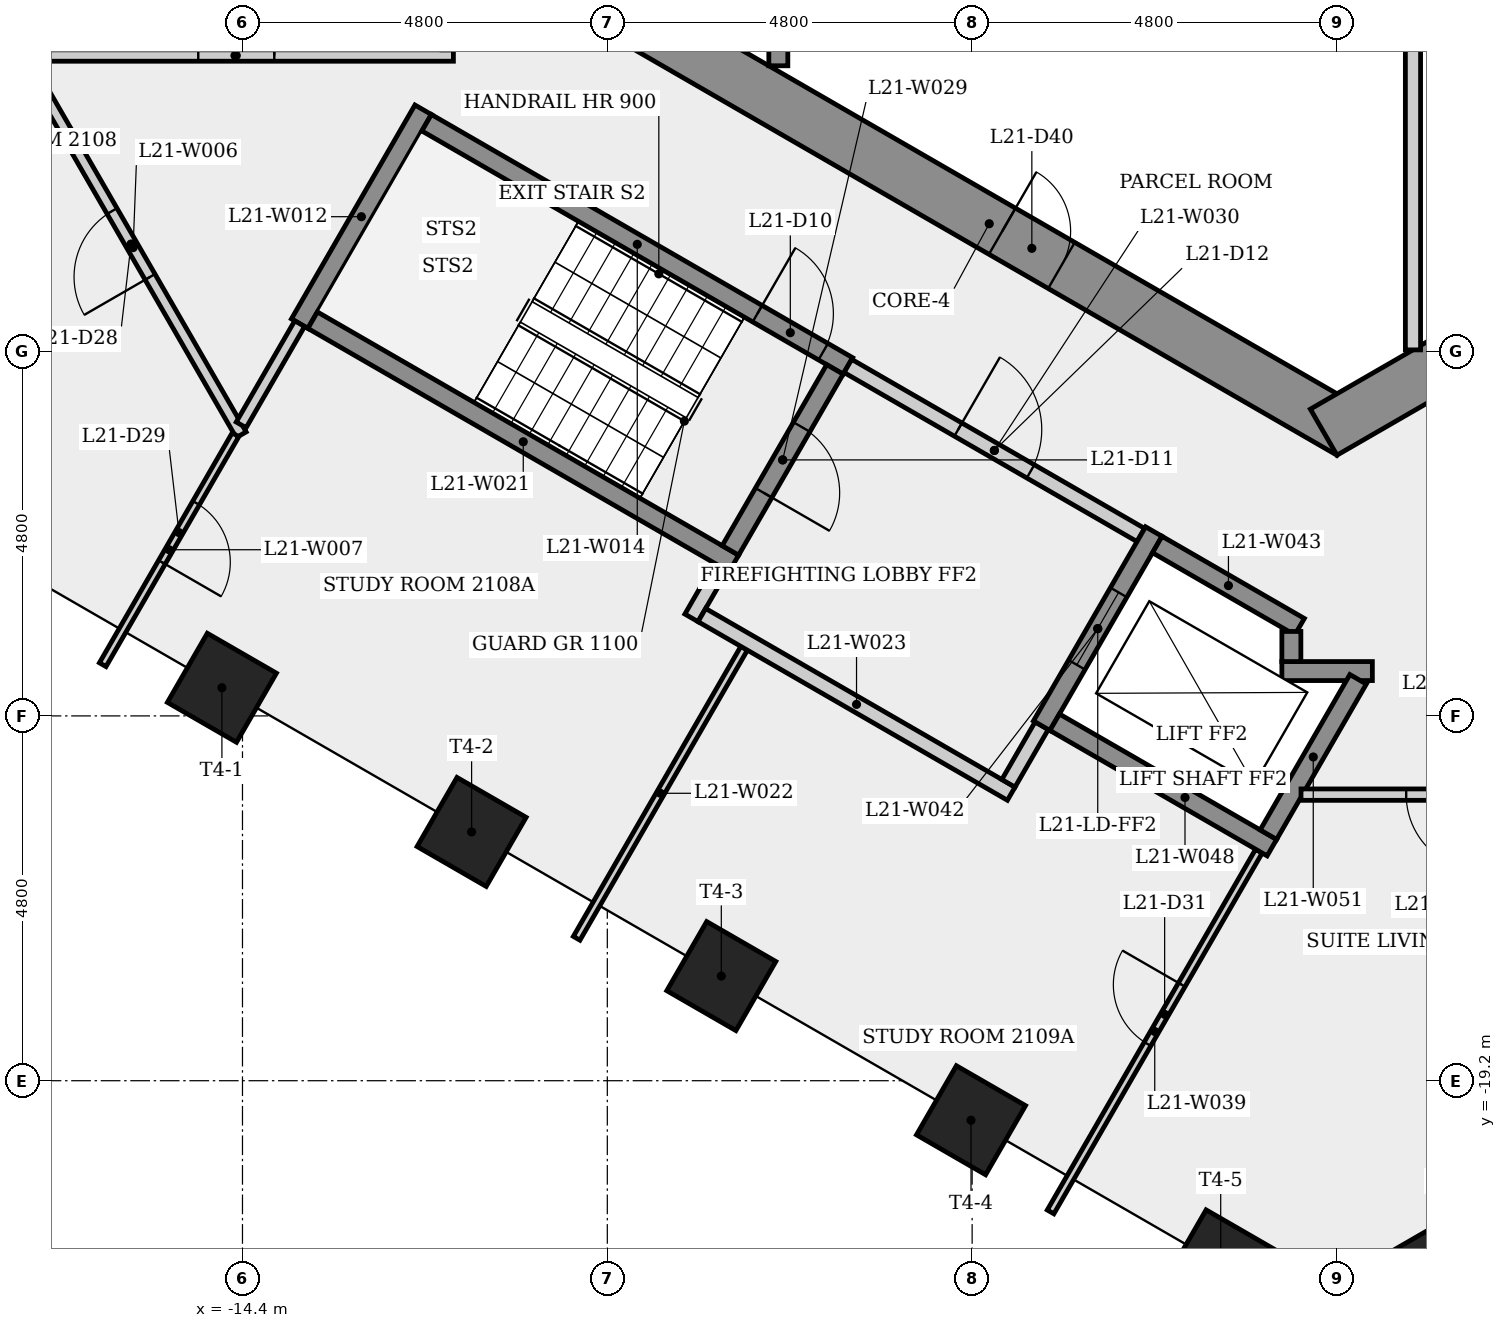
"""IFC4 building model, lengths in metres.
Left out: names, types, materials, properties, quantities, classifications, styles, units other than length and angle.
Written with IfcOpenShell. Run it as: python <this file> out.ifc"""

import sys

from ifc_helpers import new_model, si_unit, direction, frame, frame_2d, origin, origin_2d, place, context, subcontext, project, spatial, rectangle, extrude, element, fill, save


model = new_model("IFC4")
c1 = context("Model", 3, precision=1e-05, world=origin(), true_north=direction((0.0, 1.0)))
c2 = subcontext(c1, "Body", "Model", "MODEL_VIEW")
j1 = project(units=[si_unit("LENGTHUNIT", "METRE"), si_unit("PLANEANGLEUNIT", "RADIAN")], contexts=[c1])
p1 = place(None, origin())
s1 = spatial("IfcSite", under=j1, at=p1, CompositionType="ELEMENT")
p2 = place(p1, origin())
s2 = spatial("IfcBuilding", under=s1, at=p2, CompositionType="ELEMENT")
p3 = place(p2, frame((0.0, 0.0, 83.1)))
s3 = spatial("IfcBuildingStorey", under=s2, at=p3, CompositionType="ELEMENT", Elevation=83.1)
p4 = place(p3, frame((-9.325, -5.182, 0.0), z_axis=(0.0, 0.0, 1.0), x_axis=(0.866023993627, -0.500002442456, 0.0)))
e1 = element("IfcWall", 1, at=p4, inside=s3, PredefinedType="SHEAR", context=c2, shape_type="SweptSolid", body=[
    extrude(rectangle(XDim=10.97, YDim=0.7, at=frame_2d((5.485, 0.0))), origin(), (0.0, 0.0, 1.0), 3.4),
])
p5 = place(p4, frame((5.682, 0.0, 0.0)))
e2 = element("IfcOpeningElement", 2, at=p5, cuts=e1, PredefinedType="OPENING", context=c2, shape_type="SweptSolid", body=[
    extrude(rectangle(XDim=0.9, YDim=2.1, at=frame_2d((0.45, 1.05))), frame((0.0, 0.36, 0.0), z_axis=(0.0, -1.0, 0.0), x_axis=(1.0, 0.0, 0.0)), (0.0, 0.0, 1.0), 0.72),
])
p6 = place(p3, frame((-0.175, -10.667, 0.0), z_axis=(0.0, 0.0, 1.0), x_axis=(0.866023993627, 0.500002442456, 0.0)))
e3 = element("IfcWall", 3, at=p6, inside=s3, PredefinedType="SHEAR", context=c2, shape_type="SweptSolid", body=[
    extrude(rectangle(XDim=10.97, YDim=0.7, at=frame_2d((5.485, 0.0))), origin(), (0.0, 0.0, 1.0), 3.4),
])
p7 = place(p6, frame((7.252, 0.0, 0.0)))
e4 = element("IfcOpeningElement", 4, at=p7, cuts=e3, PredefinedType="OPENING", context=c2, shape_type="SweptSolid", body=[
    extrude(rectangle(XDim=0.9, YDim=2.1, at=frame_2d((0.45, 1.05))), frame((0.0, 0.36, 0.0), z_axis=(0.0, -1.0, 0.0), x_axis=(1.0, 0.0, 0.0)), (0.0, 0.0, 1.0), 0.72),
])
for number, where, z_axis, x_axis in (
    (5, (-14.671, -14.03, 0.0), (0.0, 0.0, 1.0), (-0.5, -0.866, 0.0)),
    (6, (-11.385, -15.927, 0.0), (0.0, 0.0, 1.0), (-0.5, -0.866, 0.0)),
    (7, (-8.1, -17.823, 0.0), (0.0, 0.0, 1.0), (-0.5, -0.866, 0.0)),
    (8, (-4.815, -19.72, 0.0), (0.0, 0.0, 1.0), (-0.5, -0.866, 0.0)),
    (9, (-1.53, -21.617, 0.0), (0.0, 0.0, 1.0), (-0.5, -0.866, 0.0)),
    (10, (1.47, -21.617, 0.0), (0.0, 0.0, 1.0), (0.5, -0.866, 0.0)),
):
    element("IfcColumn", number, at=place(p3, frame(where, z_axis=z_axis, x_axis=x_axis)), inside=s3, PredefinedType="COLUMN", context=c2, shape_type="SweptSolid", body=[
        extrude(rectangle(XDim=1.05, YDim=1.05, at=origin_2d()), origin(), (0.0, 0.0, 1.0), 3.4),
    ])
p8 = place(p3, frame((-17.373, -5.711, 0.0), z_axis=(0.0, 0.0, 1.0), x_axis=(1.0, 0.0, 0.0)))
e11 = element("IfcWall", 11, at=p8, inside=s3, PredefinedType="PARTITIONING", context=c2, shape_type="SweptSolid", body=[
    extrude(rectangle(XDim=5.748, YDim=0.15, at=frame_2d((2.874, 0.0))), origin(), (0.0, 0.0, 1.0), 3.05),
])
p9 = place(p8, frame((2.391, 0.0, 0.0)))
e12 = element("IfcOpeningElement", 12, at=p9, cuts=e11, PredefinedType="OPENING", context=c2, shape_type="SweptSolid", body=[
    extrude(rectangle(XDim=1.0, YDim=2.1, at=frame_2d((0.5, 1.05))), frame((0.0, 0.085, 0.0), z_axis=(0.0, -1.0, 0.0), x_axis=(1.0, 0.0, 0.0)), (0.0, 0.0, 1.0), 0.17),
])
p10 = place(p3, frame((-14.417, -10.701, 0.0), z_axis=(0.0, 0.0, 1.0), x_axis=(-0.499985050258, 0.86603403485, 0.0)))
e13 = element("IfcWall", 13, at=p10, inside=s3, PredefinedType="PARTITIONING", context=c2, shape_type="SweptSolid", body=[
    extrude(rectangle(XDim=5.687, YDim=0.15, at=frame_2d((2.844, 0.0))), origin(), (0.0, 0.0, 1.0), 3.05),
])
p11 = place(p10, frame((2.398, 0.0, 0.0)))
e14 = element("IfcOpeningElement", 14, at=p11, cuts=e13, PredefinedType="OPENING", context=c2, shape_type="SweptSolid", body=[
    extrude(rectangle(XDim=1.0, YDim=2.1, at=frame_2d((0.5, 1.05))), frame((0.0, 0.085, 0.0), z_axis=(0.0, -1.0, 0.0), x_axis=(1.0, 0.0, 0.0)), (0.0, 0.0, 1.0), 0.17),
])
p12 = place(p3, frame((-14.492, -10.701, 0.0), z_axis=(0.0, 0.0, 1.0), x_axis=(-0.500024920542, -0.866011015424, 0.0)))
e15 = element("IfcWall", 15, at=p12, inside=s3, PredefinedType="PARTITIONING", context=c2, shape_type="SweptSolid", body=[
    extrude(rectangle(XDim=3.493, YDim=0.1, at=frame_2d((1.747, 0.0))), origin(), (0.0, 0.0, 1.0), 3.05),
])
p13 = place(p12, frame((1.036, 0.0, 0.0)))
e16 = element("IfcOpeningElement", 16, at=p13, cuts=e15, PredefinedType="OPENING", context=c2, shape_type="SweptSolid", body=[
    extrude(rectangle(XDim=0.9, YDim=2.1, at=frame_2d((0.45, 1.05))), frame((0.0, 0.06, 0.0), z_axis=(0.0, -1.0, 0.0), x_axis=(1.0, 0.0, 0.0)), (0.0, 0.0, 1.0), 0.12),
])
p14 = place(p3, frame((-13.648, -9.239, 0.0), z_axis=(0.0, 0.0, 1.0), x_axis=(0.500017246033, 0.866015446554, 0.0)))
e17 = element("IfcWall", 17, at=p14, inside=s3, PredefinedType="SHEAR", context=c2, shape_type="SweptSolid", body=[
    extrude(rectangle(XDim=3.25, YDim=0.25, at=frame_2d((1.625, 0.0))), origin(), (0.0, 0.0, 1.0), 3.05),
])
p15 = place(p3, frame((-13.648, -9.239, 0.0), z_axis=(0.0, 0.0, 1.0), x_axis=(-0.500116286968, -0.865958255061, 0.0)))
e18 = element("IfcWall", 18, at=p15, inside=s3, PredefinedType="PARTITIONING", context=c2, shape_type="SweptSolid", body=[
    extrude(rectangle(XDim=1.538, YDim=0.15, at=frame_2d((0.769, 0.0))), origin(), (0.0, 0.0, 1.0), 3.05),
])
p16 = place(p3, frame((-11.977, -6.595, 0.0), z_axis=(0.0, 0.0, 1.0), x_axis=(0.866025499775, -0.499999833739, 0.0)))
e19 = element("IfcWall", 19, at=p16, inside=s3, PredefinedType="SHEAR", context=c2, shape_type="SweptSolid", body=[
    extrude(rectangle(XDim=6.4, YDim=0.25, at=frame_2d((3.2, 0.0))), origin(), (0.0, 0.0, 1.0), 3.05),
])
p17 = place(p16, frame((5.025, 0.0, 0.0)))
e20 = element("IfcOpeningElement", 20, at=p17, cuts=e19, PredefinedType="OPENING", context=c2, shape_type="SweptSolid", body=[
    extrude(rectangle(XDim=1.0, YDim=2.1, at=frame_2d((0.5, 1.05))), frame((0.0, 0.135, 0.0), z_axis=(0.0, -1.0, 0.0), x_axis=(1.0, 0.0, 0.0)), (0.0, 0.0, 1.0), 0.27),
])
p18 = place(p3, frame((-8.493, -13.11, 0.0), z_axis=(0.0, 0.0, 1.0), x_axis=(0.500067724834, 0.865986299303, 0.0)))
e21 = element("IfcWall", 21, at=p18, inside=s3, PredefinedType="PARTITIONING", context=c2, shape_type="SweptSolid", body=[
    extrude(rectangle(XDim=0.775, YDim=0.2, at=frame_2d((0.388, 0.0))), origin(), (0.0, 0.0, 1.0), 3.05),
])
p19 = place(p3, frame((-7.935, -12.393, 0.0), z_axis=(0.0, 0.0, 1.0), x_axis=(-0.866025499775, 0.499999833739, 0.0)))
e22 = element("IfcWall", 22, at=p19, inside=s3, PredefinedType="SHEAR", context=c2, shape_type="SweptSolid", body=[
    extrude(rectangle(XDim=6.4, YDim=0.25, at=frame_2d((3.2, 0.0))), origin(), (0.0, 0.0, 1.0), 3.05),
])
p20 = place(p3, frame((-7.8, -13.51, 0.0), z_axis=(0.0, 0.0, 1.0), x_axis=(-0.5000181976, -0.86601489714, 0.0)))
e23 = element("IfcWall", 23, at=p20, inside=s3, PredefinedType="PARTITIONING", context=c2, shape_type="SweptSolid", body=[
    extrude(rectangle(XDim=4.406, YDim=0.1, at=frame_2d((2.203, 0.0))), origin(), (0.0, 0.0, 1.0), 3.05),
])
p21 = place(p3, frame((-8.356, -13.073, 0.0), z_axis=(0.0, 0.0, 1.0), x_axis=(0.866038532462, -0.499977259774, 0.0)))
e24 = element("IfcWall", 24, at=p21, inside=s3, PredefinedType="PARTITIONING", context=c2, shape_type="SweptSolid", body=[
    extrude(rectangle(XDim=4.7, YDim=0.2, at=frame_2d((2.35, 0.0))), origin(), (0.0, 0.0, 1.0), 3.05),
])
p22 = place(p3, frame((-7.35, -5.846, 0.0), z_axis=(0.0, 0.0, 1.0), x_axis=(0.0, 1.0, 0.0)))
e25 = element("IfcWall", 25, at=p22, inside=s3, PredefinedType="SHEAR", context=c2, shape_type="SweptSolid", body=[
    extrude(rectangle(XDim=4.171, YDim=0.25, at=frame_2d((2.085, 0.0))), origin(), (0.0, 0.0, 1.0), 3.05),
])
p23 = place(p3, frame((-6.605, -9.841, 0.0), z_axis=(0.0, 0.0, 1.0), x_axis=(-0.499996545922, -0.866027397988, 0.0)))
e26 = element("IfcWall", 26, at=p23, inside=s3, PredefinedType="SHEAR", context=c2, shape_type="SweptSolid", body=[
    extrude(rectangle(XDim=2.75, YDim=0.25, at=frame_2d((1.375, 0.0))), origin(), (0.0, 0.0, 1.0), 3.05),
])
p24 = place(p23, frame((0.875, 0.0, 0.0)))
e27 = element("IfcOpeningElement", 27, at=p24, cuts=e26, PredefinedType="OPENING", context=c2, shape_type="SweptSolid", body=[
    extrude(rectangle(XDim=1.0, YDim=2.1, at=frame_2d((0.5, 1.05))), frame((0.0, 0.135, 0.0), z_axis=(0.0, -1.0, 0.0), x_axis=(1.0, 0.0, 0.0)), (0.0, 0.0, 1.0), 0.27),
])
p25 = place(p3, frame((-6.435, -9.795, 0.0), z_axis=(0.0, 0.0, 1.0), x_axis=(0.866012907634, -0.500021643343, 0.0)))
e28 = element("IfcWall", 28, at=p25, inside=s3, PredefinedType="PARTITIONING", context=c2, shape_type="SweptSolid", body=[
    extrude(rectangle(XDim=4.45, YDim=0.2, at=frame_2d((2.225, 0.0))), origin(), (0.0, 0.0, 1.0), 3.05),
])
p26 = place(p25, frame((1.675, 0.0, 0.0)))
e29 = element("IfcOpeningElement", 29, at=p26, cuts=e28, PredefinedType="OPENING", context=c2, shape_type="SweptSolid", body=[
    extrude(rectangle(XDim=1.1, YDim=2.1, at=frame_2d((0.55, 1.05))), frame((0.0, 0.11, 0.0), z_axis=(0.0, -1.0, 0.0), x_axis=(1.0, 0.0, 0.0)), (0.0, 0.0, 1.0), 0.22),
])
p27 = place(p3, frame((-3.885, -14.529, 0.0), z_axis=(0.0, 0.0, 1.0), x_axis=(-0.499859285417, -0.866106630146, 0.0)))
e30 = element("IfcWall", 30, at=p27, inside=s3, PredefinedType="PARTITIONING", context=c2, shape_type="SweptSolid", body=[
    extrude(rectangle(XDim=0.875, YDim=0.2, at=frame_2d((0.438, 0.0))), origin(), (0.0, 0.0, 1.0), 3.05),
])
p28 = place(p3, frame((-3.768, -20.926, 0.0), z_axis=(0.0, 0.0, 1.0), x_axis=(0.499980760091, 0.866036511666, 0.0)))
e31 = element("IfcWall", 31, at=p28, inside=s3, PredefinedType="PARTITIONING", context=c2, shape_type="SweptSolid", body=[
    extrude(rectangle(XDim=5.482, YDim=0.1, at=frame_2d((2.741, 0.0))), origin(), (0.0, 0.0, 1.0), 3.05),
])
p29 = place(p28, frame((2.551, 0.0, 0.0)))
e32 = element("IfcOpeningElement", 32, at=p29, cuts=e31, PredefinedType="OPENING", context=c2, shape_type="SweptSolid", body=[
    extrude(rectangle(XDim=0.9, YDim=2.1, at=frame_2d((0.45, 1.05))), frame((0.0, 0.06, 0.0), z_axis=(0.0, -1.0, 0.0), x_axis=(1.0, 0.0, 0.0)), (0.0, 0.0, 1.0), 0.12),
])
p30 = place(p3, frame((-2.41, -11.974, 0.0), z_axis=(0.0, 0.0, 1.0), x_axis=(-0.500001826776, -0.866024349092, 0.0)))
e33 = element("IfcWall", 33, at=p30, inside=s3, PredefinedType="SHEAR", context=c2, shape_type="SweptSolid", body=[
    extrude(rectangle(XDim=2.95, YDim=0.25, at=frame_2d((1.475, 0.0))), origin(), (0.0, 0.0, 1.0), 3.05),
])
p31 = place(p30, frame((0.925, 0.0, 0.0)))
e34 = element("IfcOpeningElement", 34, at=p31, cuts=e33, PredefinedType="OPENING", context=c2, shape_type="SweptSolid", body=[
    extrude(rectangle(XDim=1.1, YDim=2.1, at=frame_2d((0.55, 1.05))), frame((0.0, 0.135, 0.0), z_axis=(0.0, -1.0, 0.0), x_axis=(1.0, 0.0, 0.0)), (0.0, 0.0, 1.0), 0.27),
])
p32 = place(p3, frame((-2.364, -12.145, 0.0), z_axis=(0.0, 0.0, 1.0), x_axis=(0.86603892542, -0.499976579108, 0.0)))
e35 = element("IfcWall", 35, at=p32, inside=s3, PredefinedType="SHEAR", context=c2, shape_type="SweptSolid", body=[
    extrude(rectangle(XDim=2.162, YDim=0.25, at=frame_2d((1.081, 0.0))), origin(), (0.0, 0.0, 1.0), 3.05),
])
p33 = place(p3, frame((-0.856, -16.133, 0.0), z_axis=(0.0, 0.0, 1.0), x_axis=(-0.866021716278, 0.500006386895, 0.0)))
e36 = element("IfcWall", 36, at=p33, inside=s3, PredefinedType="SHEAR", context=c2, shape_type="SweptSolid", body=[
    extrude(rectangle(XDim=3.3, YDim=0.25, at=frame_2d((1.65, 0.0))), origin(), (0.0, 0.0, 1.0), 3.05),
])
p34 = place(p3, frame((-0.725, -13.81, 0.0), z_axis=(0.0, 0.0, 1.0), x_axis=(1.0, 0.0, 0.0)))
e37 = element("IfcWall", 37, at=p34, inside=s3, PredefinedType="SHEAR", context=c2, shape_type="SweptSolid", body=[
    extrude(rectangle(XDim=1.191, YDim=0.25, at=frame_2d((0.595, 0.0))), origin(), (0.0, 0.0, 1.0), 3.05),
])
p35 = place(p3, frame((-0.6, -13.289, 0.0), z_axis=(0.0, 0.0, 1.0), x_axis=(0.0, -1.0, 0.0)))
e38 = element("IfcWall", 38, at=p35, inside=s3, PredefinedType="SHEAR", context=c2, shape_type="SweptSolid", body=[
    extrude(rectangle(XDim=0.396, YDim=0.25, at=frame_2d((0.198, 0.0))), origin(), (0.0, 0.0, 1.0), 3.4),
])
p36 = place(p3, frame((-0.902, -15.962, 0.0), z_axis=(0.0, 0.0, 1.0), x_axis=(0.49998806882, 0.866032292145, 0.0)))
e39 = element("IfcWall", 39, at=p36, inside=s3, PredefinedType="SHEAR", context=c2, shape_type="SweptSolid", body=[
    extrude(rectangle(XDim=2.36, YDim=0.25, at=frame_2d((1.18, 0.0))), origin(), (0.0, 0.0, 1.0), 3.4),
])
p37 = place(p3, frame((1.0, -5.275, 0.0), z_axis=(0.0, 0.0, 1.0), x_axis=(0.0, -1.0, 0.0)))
e40 = element("IfcWall", 40, at=p37, inside=s3, PredefinedType="PARTITIONING", context=c2, shape_type="SweptSolid", body=[
    extrude(rectangle(XDim=4.309, YDim=0.2, at=frame_2d((2.155, 0.0))), origin(), (0.0, 0.0, 1.0), 3.05),
])
p38 = place(p3, frame((3.294, -15.436, 0.0), z_axis=(0.0, 0.0, 1.0), x_axis=(-1.0, 0.0, 0.0)))
e41 = element("IfcWall", 41, at=p38, inside=s3, PredefinedType="PARTITIONING", context=c2, shape_type="SweptSolid", body=[
    extrude(rectangle(XDim=3.768, YDim=0.15, at=frame_2d((1.884, 0.0))), origin(), (0.0, 0.0, 1.0), 3.05),
])
p39 = place(p38, frame((1.384, 0.0, 0.0)))
e42 = element("IfcOpeningElement", 42, at=p39, cuts=e41, PredefinedType="OPENING", context=c2, shape_type="SweptSolid", body=[
    extrude(rectangle(XDim=1.0, YDim=2.1, at=frame_2d((0.5, 1.05))), frame((0.0, 0.085, 0.0), z_axis=(0.0, -1.0, 0.0), x_axis=(1.0, 0.0, 0.0)), (0.0, 0.0, 1.0), 0.17),
])
p40 = place(p17, origin())
e43 = element("IfcDoor", 43, at=p40, inside=s3, OperationType="SINGLE_SWING_LEFT", PredefinedType="DOOR", context=c2, shape_type="SweptSolid", body=[
    extrude(rectangle(XDim=1.0, YDim=2.1, at=frame_2d((0.5, 1.05))), frame((0.0, 0.025, 0.0), z_axis=(0.0, -1.0, 0.0), x_axis=(1.0, 0.0, 0.0)), (0.0, 0.0, 1.0), 0.05),
])
fill(e20, e43)
p41 = place(p24, origin())
e44 = element("IfcDoor", 44, at=p41, inside=s3, OperationType="SINGLE_SWING_RIGHT", PredefinedType="DOOR", context=c2, shape_type="SweptSolid", body=[
    extrude(rectangle(XDim=1.0, YDim=2.1, at=frame_2d((0.5, 1.05))), frame((0.0, 0.025, 0.0), z_axis=(0.0, -1.0, 0.0), x_axis=(1.0, 0.0, 0.0)), (0.0, 0.0, 1.0), 0.05),
])
fill(e27, e44)
p42 = place(p26, origin())
e45 = element("IfcDoor", 45, at=p42, inside=s3, OperationType="SINGLE_SWING_LEFT", PredefinedType="DOOR", context=c2, shape_type="SweptSolid", body=[
    extrude(rectangle(XDim=1.1, YDim=2.1, at=frame_2d((0.55, 1.05))), frame((0.0, 0.025, 0.0), z_axis=(0.0, -1.0, 0.0), x_axis=(1.0, 0.0, 0.0)), (0.0, 0.0, 1.0), 0.05),
])
fill(e29, e45)
p43 = place(p31, origin())
e46 = element("IfcDoor", 46, at=p43, inside=s3, OperationType="SLIDING_TO_LEFT", PredefinedType="DOOR", context=c2, shape_type="SweptSolid", body=[
    extrude(rectangle(XDim=1.1, YDim=2.1, at=frame_2d((0.55, 1.05))), frame((0.0, 0.025, 0.0), z_axis=(0.0, -1.0, 0.0), x_axis=(1.0, 0.0, 0.0)), (0.0, 0.0, 1.0), 0.05),
])
fill(e34, e46)
p44 = place(p9, origin())
e47 = element("IfcDoor", 47, at=p44, inside=s3, OperationType="SINGLE_SWING_RIGHT", PredefinedType="DOOR", context=c2, shape_type="SweptSolid", body=[
    extrude(rectangle(XDim=1.0, YDim=2.1, at=frame_2d((0.5, 1.05))), frame((0.0, 0.025, 0.0), z_axis=(0.0, -1.0, 0.0), x_axis=(1.0, 0.0, 0.0)), (0.0, 0.0, 1.0), 0.05),
])
fill(e12, e47)
p45 = place(p11, origin())
e48 = element("IfcDoor", 48, at=p45, inside=s3, OperationType="SINGLE_SWING_LEFT", PredefinedType="DOOR", context=c2, shape_type="SweptSolid", body=[
    extrude(rectangle(XDim=1.0, YDim=2.1, at=frame_2d((0.5, 1.05))), frame((0.0, 0.025, 0.0), z_axis=(0.0, -1.0, 0.0), x_axis=(1.0, 0.0, 0.0)), (0.0, 0.0, 1.0), 0.05),
])
fill(e14, e48)
p46 = place(p13, origin())
e49 = element("IfcDoor", 49, at=p46, inside=s3, OperationType="SINGLE_SWING_RIGHT", PredefinedType="DOOR", context=c2, shape_type="SweptSolid", body=[
    extrude(rectangle(XDim=0.9, YDim=2.1, at=frame_2d((0.45, 1.05))), frame((0.0, 0.025, 0.0), z_axis=(0.0, -1.0, 0.0), x_axis=(1.0, 0.0, 0.0)), (0.0, 0.0, 1.0), 0.05),
])
fill(e16, e49)
p47 = place(p39, origin())
e50 = element("IfcDoor", 50, at=p47, inside=s3, OperationType="SINGLE_SWING_LEFT", PredefinedType="DOOR", context=c2, shape_type="SweptSolid", body=[
    extrude(rectangle(XDim=1.0, YDim=2.1, at=frame_2d((0.5, 1.05))), frame((0.0, 0.025, 0.0), z_axis=(0.0, -1.0, 0.0), x_axis=(1.0, 0.0, 0.0)), (0.0, 0.0, 1.0), 0.05),
])
fill(e42, e50)
p48 = place(p29, origin())
e51 = element("IfcDoor", 51, at=p48, inside=s3, OperationType="SINGLE_SWING_RIGHT", PredefinedType="DOOR", context=c2, shape_type="SweptSolid", body=[
    extrude(rectangle(XDim=0.9, YDim=2.1, at=frame_2d((0.45, 1.05))), frame((0.0, 0.025, 0.0), z_axis=(0.0, -1.0, 0.0), x_axis=(1.0, 0.0, 0.0)), (0.0, 0.0, 1.0), 0.05),
])
fill(e32, e51)
p49 = place(p5, origin())
e52 = element("IfcDoor", 52, at=p49, inside=s3, OperationType="SINGLE_SWING_LEFT", PredefinedType="DOOR", context=c2, shape_type="SweptSolid", body=[
    extrude(rectangle(XDim=0.9, YDim=2.1, at=frame_2d((0.45, 1.05))), frame((0.0, 0.025, 0.0), z_axis=(0.0, -1.0, 0.0), x_axis=(1.0, 0.0, 0.0)), (0.0, 0.0, 1.0), 0.05),
])
fill(e2, e52)
save(model, sys.argv[1])
